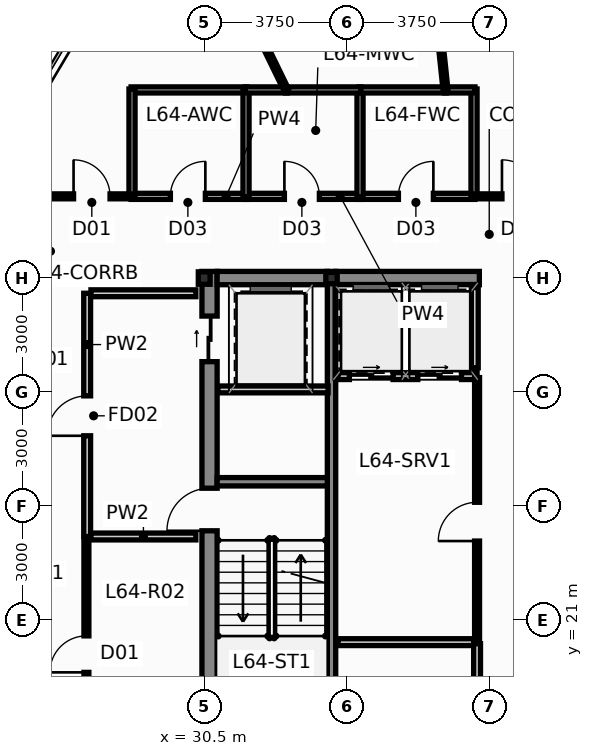
"""IFC4 building model, lengths in metres.
Left out: names, types, materials, properties, quantities, classifications, styles, units other than length and angle.
Written with IfcOpenShell. Run it as: python <this file> out.ifc"""

import sys

from ifc_helpers import new_model, si_unit, direction, frame, frame_2d, origin, origin_2d, place, context, subcontext, project, spatial, rectangle, hollow_rectangle, i_section, extrude, source, transform, mapped, element, fill, save


model = new_model("IFC4")
c1 = context("Model", 3, precision=1e-05, world=origin(), true_north=direction((0.0, 1.0)))
c2 = subcontext(c1, "Body", "Model", "MODEL_VIEW")
j1 = project(units=[si_unit("LENGTHUNIT", "METRE"), si_unit("PLANEANGLEUNIT", "RADIAN")], contexts=[c1])
p1 = place(None, origin())
s1 = spatial("IfcSite", under=j1, at=p1, CompositionType="ELEMENT")
p2 = place(p1, origin())
s2 = spatial("IfcBuilding", under=s1, at=p2, CompositionType="ELEMENT")
p3 = place(p2, frame((0.0, 0.0, 244.45)))
s3 = spatial("IfcBuildingStorey", under=s2, at=p3, CompositionType="ELEMENT", Elevation=244.45)
m1 = source(origin(), c2, "Body", "SweptSolid", [
    extrude(i_section(OverallWidth=0.311, OverallDepth=0.327, WebThickness=0.016, FlangeThickness=0.025, at=origin_2d()), origin(), (0.0, 0.0, 1.0), 3.65),
])
p4 = place(p3, frame((30.5, 30.0, 0.0), z_axis=(0.0, 0.0, 1.0), x_axis=(1.0, 0.0, 0.0)))
e1 = element("IfcColumn", 1, at=p4, inside=s3, PredefinedType="COLUMN", context=c2, shape_type="MappedRepresentation", body=[
    mapped(m1, transform((0.0, 0.0, 0.0), scale=1.0)),
])
m2 = source(origin(), c2, "Body", "SweptSolid", [
    extrude(hollow_rectangle(XDim=0.3, YDim=0.3, WallThickness=0.012, at=origin_2d()), origin(), (0.0, 0.0, 1.0), 3.65),
])
p5 = place(p3, frame((33.85, 30.0, 0.0), z_axis=(0.0, 0.0, 1.0), x_axis=(1.0, 0.0, 0.0)))
e2 = element("IfcColumn", 2, at=p5, inside=s3, PredefinedType="COLUMN", context=c2, shape_type="MappedRepresentation", body=[
    mapped(m2, transform((0.0, 0.0, 0.0), scale=1.0)),
])
p6 = place(p3, frame((30.64, 17.05, 0.0), z_axis=(0.0, 0.0, 1.0), x_axis=(0.0, 1.0, 0.0)))
e3 = element("IfcWall", 3, at=p6, inside=s3, PredefinedType="SHEAR", context=c2, shape_type="SweptSolid", body=[
    extrude(rectangle(XDim=13.125, YDim=0.4, at=frame_2d((6.562, 0.0))), origin(), (0.0, 0.0, 1.0), 3.65),
])
p7 = place(p6, frame((6.3, 0.0, 0.0)))
e4 = element("IfcOpeningElement", 4, at=p7, cuts=e3, PredefinedType="OPENING", context=c2, shape_type="SweptSolid", body=[
    extrude(rectangle(XDim=1.12, YDim=2.15, at=frame_2d((0.56, 1.075))), frame((0.0, 0.212, 0.0), z_axis=(0.0, -1.0, 0.0), x_axis=(1.0, 0.0, 0.0)), (0.0, 0.0, 1.0), 0.424),
])
p8 = place(p6, frame((10.75, 0.0, 0.0)))
e5 = element("IfcOpeningElement", 5, at=p8, cuts=e3, PredefinedType="OPENING", context=c2, shape_type="SweptSolid", body=[
    extrude(rectangle(XDim=1.2, YDim=2.2, at=frame_2d((0.6, 1.1))), frame((0.0, 0.212, 0.0), z_axis=(0.0, -1.0, 0.0), x_axis=(1.0, 0.0, 0.0)), (0.0, 0.0, 1.0), 0.424),
])
p9 = place(p3, frame((30.84, 30.0, 0.0), z_axis=(0.0, 0.0, 1.0), x_axis=(1.0, 0.0, 0.0)))
e6 = element("IfcWall", 6, at=p9, inside=s3, PredefinedType="SHEAR", context=c2, shape_type="SweptSolid", body=[
    extrude(rectangle(XDim=2.9, YDim=0.35, at=frame_2d((1.45, 0.0))), origin(), (0.0, 0.0, 1.0), 3.65),
])
p10 = place(p3, frame((33.96, 30.0, 0.0), z_axis=(0.0, 0.0, 1.0), x_axis=(1.0, 0.0, 0.0)))
e7 = element("IfcWall", 7, at=p10, inside=s3, PredefinedType="SHEAR", context=c2, shape_type="SweptSolid", body=[
    extrude(rectangle(XDim=3.78, YDim=0.35, at=frame_2d((1.89, 0.0))), origin(), (0.0, 0.0, 1.0), 3.65),
])
p11 = place(p3, frame((33.85, 17.05, 0.0), z_axis=(0.0, 0.0, 1.0), x_axis=(0.0, 1.0, 0.0)))
e8 = element("IfcWall", 8, at=p11, inside=s3, PredefinedType="SHEAR", context=c2, shape_type="SweptSolid", body=[
    extrude(rectangle(XDim=13.125, YDim=0.22, at=frame_2d((6.562, 0.0))), origin(), (0.0, 0.0, 1.0), 3.65),
])
p12 = place(p3, frame((30.84, 24.64, 0.0), z_axis=(0.0, 0.0, 1.0), x_axis=(1.0, 0.0, 0.0)))
e9 = element("IfcWall", 9, at=p12, inside=s3, PredefinedType="SHEAR", context=c2, shape_type="SweptSolid", body=[
    extrude(rectangle(XDim=2.9, YDim=0.22, at=frame_2d((1.45, 0.0))), origin(), (0.0, 0.0, 1.0), 3.65),
])
p13 = place(p3, frame((34.02, 27.42, 0.0), z_axis=(0.0, 0.0, 1.0), x_axis=(1.0, 0.0, 0.0)))
e10 = element("IfcWall", 10, at=p13, inside=s3, PredefinedType="PARTITIONING", context=c2, shape_type="SweptSolid", body=[
    extrude(rectangle(XDim=3.66, YDim=0.18, at=frame_2d((1.83, 0.0))), origin(), (0.0, 0.0, 1.0), 3.4),
])
p14 = place(p13, frame((0.3, 0.0, 0.0)))
e11 = element("IfcOpeningElement", 11, at=p14, cuts=e10, PredefinedType="OPENING", context=c2, shape_type="SweptSolid", body=[
    extrude(rectangle(XDim=1.15, YDim=2.2, at=frame_2d((0.575, 1.1))), frame((0.0, 0.102, 0.0), z_axis=(0.0, -1.0, 0.0), x_axis=(1.0, 0.0, 0.0)), (0.0, 0.0, 1.0), 0.204),
])
p15 = place(p13, frame((2.1, 0.0, 0.0)))
e12 = element("IfcOpeningElement", 12, at=p15, cuts=e10, PredefinedType="OPENING", context=c2, shape_type="SweptSolid", body=[
    extrude(rectangle(XDim=1.15, YDim=2.2, at=frame_2d((0.575, 1.1))), frame((0.0, 0.102, 0.0), z_axis=(0.0, -1.0, 0.0), x_axis=(1.0, 0.0, 0.0)), (0.0, 0.0, 1.0), 0.204),
])
p16 = place(p3, frame((37.62, 27.64, 0.0), z_axis=(0.0, 0.0, 1.0), x_axis=(0.0, 1.0, 0.0)))
e13 = element("IfcWall", 13, at=p16, inside=s3, PredefinedType="PARTITIONING", context=c2, shape_type="SweptSolid", body=[
    extrude(rectangle(XDim=2.11, YDim=0.18, at=frame_2d((1.055, 0.0))), origin(), (0.0, 0.0, 1.0), 3.4),
])
p17 = place(p3, frame((27.42, 23.2, 0.0), z_axis=(0.0, 0.0, 1.0), x_axis=(0.0, 1.0, 0.0)))
e14 = element("IfcWall", 14, at=p17, inside=s3, PredefinedType="PARTITIONING", context=c2, shape_type="SweptSolid", body=[
    extrude(rectangle(XDim=6.4, YDim=0.18, at=frame_2d((3.2, 0.0))), origin(), (0.0, 0.0, 1.0), 3.129),
])
p18 = place(p17, frame((2.65, 0.0, 0.0)))
e15 = element("IfcOpeningElement", 15, at=p18, cuts=e14, PredefinedType="OPENING", context=c2, shape_type="SweptSolid", body=[
    extrude(rectangle(XDim=1.05, YDim=2.15, at=frame_2d((0.525, 1.075))), frame((0.0, 0.102, 0.0), z_axis=(0.0, -1.0, 0.0), x_axis=(1.0, 0.0, 0.0)), (0.0, 0.0, 1.0), 0.204),
])
for number, where, z_axis, x_axis in (
    (16, (27.52, 23.2, 0.0), (0.0, 0.0, 1.0), (1.0, 0.0, 0.0)),
    (17, (27.52, 29.6, 0.0), (0.0, 0.0, 1.0), (1.0, 0.0, 0.0)),
):
    element("IfcWall", number, at=place(p3, frame(where, z_axis=z_axis, x_axis=x_axis)), inside=s3, PredefinedType="PARTITIONING", context=c2, shape_type="SweptSolid", body=[
        extrude(rectangle(XDim=2.76, YDim=0.18, at=frame_2d((1.38, 0.0))), origin(), (0.0, 0.0, 1.0), 3.4),
    ])
p19 = place(p3, frame((30.86, 27.07, 0.0), z_axis=(0.0, 0.0, 1.0), x_axis=(1.0, 0.0, 0.0)))
e18 = element("IfcWall", 18, at=p19, inside=s3, PredefinedType="PARTITIONING", context=c2, shape_type="SweptSolid", body=[
    extrude(rectangle(XDim=2.9, YDim=0.18, at=frame_2d((1.45, 0.0))), origin(), (0.0, 0.0, 1.0), 3.4),
])
p20 = place(p3, frame((34.02, 20.42, 0.0), z_axis=(0.0, 0.0, 1.0), x_axis=(1.0, 0.0, 0.0)))
e19 = element("IfcWall", 19, at=p20, inside=s3, PredefinedType="PARTITIONING", context=c2, shape_type="SweptSolid", body=[
    extrude(rectangle(XDim=3.64, YDim=0.18, at=frame_2d((1.82, 0.0))), origin(), (0.0, 0.0, 1.0), 3.4),
])
p21 = place(p3, frame((37.68, 20.48, 0.0), z_axis=(0.0, 0.0, 1.0), x_axis=(0.0, 1.0, 0.0)))
e20 = element("IfcWall", 20, at=p21, inside=s3, PredefinedType="PARTITIONING", context=c2, shape_type="SweptSolid", body=[
    extrude(rectangle(XDim=6.9, YDim=0.13, at=frame_2d((3.45, 0.0))), origin(), (0.0, 0.0, 1.0), 3.4),
])
p22 = place(p21, frame((2.6, 0.0, 0.0)))
e21 = element("IfcOpeningElement", 21, at=p22, cuts=e20, PredefinedType="OPENING", context=c2, shape_type="SweptSolid", body=[
    extrude(rectangle(XDim=1.02, YDim=2.15, at=frame_2d((0.51, 1.075))), frame((0.0, 0.077, 0.0), z_axis=(0.0, -1.0, 0.0), x_axis=(1.0, 0.0, 0.0)), (0.0, 0.0, 1.0), 0.154),
])
p23 = place(p3, frame((37.68, 17.68, 0.0), z_axis=(0.0, 0.0, 1.0), x_axis=(0.0, 1.0, 0.0)))
e22 = element("IfcWall", 22, at=p23, inside=s3, PredefinedType="PARTITIONING", context=c2, shape_type="SweptSolid", body=[
    extrude(rectangle(XDim=2.7, YDim=0.18, at=frame_2d((1.35, 0.0))), origin(), (0.0, 0.0, 1.0), 3.4),
])
p24 = place(p23, frame((0.85, 0.0, 0.0)))
e23 = element("IfcOpeningElement", 23, at=p24, cuts=e22, PredefinedType="OPENING", context=c2, shape_type="SweptSolid", body=[
    extrude(rectangle(XDim=0.9, YDim=2.1, at=frame_2d((0.45, 1.05))), frame((0.0, 0.102, 0.0), z_axis=(0.0, -1.0, 0.0), x_axis=(1.0, 0.0, 0.0)), (0.0, 0.0, 1.0), 0.204),
])
p25 = place(p3, frame((28.575, 32.15, 0.0), z_axis=(0.0, 0.0, 1.0), x_axis=(1.0, 0.0, 0.0)))
e24 = element("IfcWall", 24, at=p25, inside=s3, PredefinedType="PLUMBINGWALL", context=c2, shape_type="SweptSolid", body=[
    extrude(rectangle(XDim=3.05, YDim=0.16, at=frame_2d((1.525, 0.0))), origin(), (0.0, 0.0, 1.0), 3.4),
])
p26 = place(p25, frame((1.035, 0.0, 0.0)))
e25 = element("IfcOpeningElement", 25, at=p26, cuts=e24, PredefinedType="OPENING", context=c2, shape_type="SweptSolid", body=[
    extrude(rectangle(XDim=0.92, YDim=2.1, at=frame_2d((0.46, 1.05))), frame((0.0, 0.092, 0.0), z_axis=(0.0, -1.0, 0.0), x_axis=(1.0, 0.0, 0.0)), (0.0, 0.0, 1.0), 0.184),
])
p27 = place(p3, frame((31.575, 32.15, 0.0), z_axis=(0.0, 0.0, 1.0), x_axis=(1.0, 0.0, 0.0)))
e26 = element("IfcWall", 26, at=p27, inside=s3, PredefinedType="PLUMBINGWALL", context=c2, shape_type="SweptSolid", body=[
    extrude(rectangle(XDim=3.05, YDim=0.16, at=frame_2d((1.525, 0.0))), origin(), (0.0, 0.0, 1.0), 3.4),
])
p28 = place(p27, frame((1.035, 0.0, 0.0)))
e27 = element("IfcOpeningElement", 27, at=p28, cuts=e26, PredefinedType="OPENING", context=c2, shape_type="SweptSolid", body=[
    extrude(rectangle(XDim=0.92, YDim=2.1, at=frame_2d((0.46, 1.05))), frame((0.0, 0.092, 0.0), z_axis=(0.0, -1.0, 0.0), x_axis=(1.0, 0.0, 0.0)), (0.0, 0.0, 1.0), 0.184),
])
p29 = place(p3, frame((34.575, 32.15, 0.0), z_axis=(0.0, 0.0, 1.0), x_axis=(1.0, 0.0, 0.0)))
e28 = element("IfcWall", 28, at=p29, inside=s3, PredefinedType="PLUMBINGWALL", context=c2, shape_type="SweptSolid", body=[
    extrude(rectangle(XDim=3.05, YDim=0.16, at=frame_2d((1.525, 0.0))), origin(), (0.0, 0.0, 1.0), 3.4),
])
p30 = place(p29, frame((1.035, 0.0, 0.0)))
e29 = element("IfcOpeningElement", 29, at=p30, cuts=e28, PredefinedType="OPENING", context=c2, shape_type="SweptSolid", body=[
    extrude(rectangle(XDim=0.92, YDim=2.1, at=frame_2d((0.46, 1.05))), frame((0.0, 0.092, 0.0), z_axis=(0.0, -1.0, 0.0), x_axis=(1.0, 0.0, 0.0)), (0.0, 0.0, 1.0), 0.184),
])
p31 = place(p3, frame((28.575, 34.95, 0.0), z_axis=(0.0, 0.0, 1.0), x_axis=(1.0, 0.0, 0.0)))
e30 = element("IfcWall", 30, at=p31, inside=s3, PredefinedType="PLUMBINGWALL", context=c2, shape_type="SweptSolid", body=[
    extrude(rectangle(XDim=3.05, YDim=0.16, at=frame_2d((1.525, 0.0))), origin(), (0.0, 0.0, 1.0), 3.4),
])
for number, where, z_axis, x_axis in (
    (31, (31.6, 32.125, 0.0), (0.0, 0.0, 1.0), (0.0, 1.0, 0.0)),
    (32, (28.6, 32.125, 0.0), (0.0, 0.0, 1.0), (0.0, 1.0, 0.0)),
):
    element("IfcWall", number, at=place(p3, frame(where, z_axis=z_axis, x_axis=x_axis)), inside=s3, PredefinedType="PLUMBINGWALL", context=c2, shape_type="SweptSolid", body=[
        extrude(rectangle(XDim=2.85, YDim=0.16, at=frame_2d((1.425, 0.0))), origin(), (0.0, 0.0, 1.0), 2.985),
    ])
for number, where, z_axis, x_axis in (
    (33, (34.6, 32.125, 0.0), (0.0, 0.0, 1.0), (0.0, 1.0, 0.0)),
    (34, (37.6, 32.125, 0.0), (0.0, 0.0, 1.0), (0.0, 1.0, 0.0)),
):
    element("IfcWall", number, at=place(p3, frame(where, z_axis=z_axis, x_axis=x_axis)), inside=s3, PredefinedType="PLUMBINGWALL", context=c2, shape_type="SweptSolid", body=[
        extrude(rectangle(XDim=2.85, YDim=0.16, at=frame_2d((1.425, 0.0))), origin(), (0.0, 0.0, 1.0), 3.4),
    ])
p32 = place(p3, frame((34.575, 34.95, 0.0), z_axis=(0.0, 0.0, 1.0), x_axis=(1.0, 0.0, 0.0)))
e35 = element("IfcWall", 35, at=p32, inside=s3, PredefinedType="PLUMBINGWALL", context=c2, shape_type="SweptSolid", body=[
    extrude(rectangle(XDim=2.3, YDim=0.16, at=frame_2d((1.15, 0.0))), origin(), (0.0, 0.0, 1.0), 3.4),
])
p33 = place(p3, frame((32.635, 34.95, 0.0), z_axis=(0.0, 0.0, 1.0), x_axis=(1.0, 0.0, 0.0)))
e36 = element("IfcWall", 36, at=p33, inside=s3, PredefinedType="PLUMBINGWALL", context=c2, shape_type="SweptSolid", body=[
    extrude(rectangle(XDim=1.99, YDim=0.16, at=frame_2d((0.995, 0.0))), origin(), (0.0, 0.0, 1.0), 3.4),
])
p34 = place(p3, frame((31.575, 34.95, 0.0), z_axis=(0.0, 0.0, 1.0), x_axis=(1.0, 0.0, 0.0)))
e37 = element("IfcWall", 37, at=p34, inside=s3, PredefinedType="PLUMBINGWALL", context=c2, shape_type="SweptSolid", body=[
    extrude(rectangle(XDim=1.11, YDim=0.16, at=frame_2d((0.555, 0.0))), origin(), (0.0, 0.0, 1.0), 3.4),
])
p35 = place(p3, frame((37.625, 34.95, 0.0), z_axis=(0.0, 0.0, 1.0), x_axis=(-1.0, 0.0, 0.0)))
e38 = element("IfcWall", 38, at=p35, inside=s3, PredefinedType="PLUMBINGWALL", context=c2, shape_type="SweptSolid", body=[
    extrude(rectangle(XDim=0.8, YDim=0.16, at=frame_2d((0.4, 0.0))), origin(), (0.0, 0.0, 1.0), 3.4),
])
p36 = place(p3, frame((35.29, 49.813, 0.0), z_axis=(0.0, 0.0, 1.0), x_axis=(0.104358123872, -0.994539784012, 0.0)))
e39 = element("IfcWall", 39, at=p36, inside=s3, PredefinedType="PARTITIONING", context=c2, shape_type="SweptSolid", body=[
    extrude(rectangle(XDim=14.94, YDim=0.13, at=frame_2d((7.47, 0.0))), origin(), (0.0, 0.0, 1.0), 3.4),
])
p37 = place(p36, frame((7.039, 0.0, 0.0)))
e40 = element("IfcOpeningElement", 40, at=p37, cuts=e39, PredefinedType="OPENING", context=c2, shape_type="SweptSolid", body=[
    extrude(rectangle(XDim=0.96, YDim=2.15, at=frame_2d((0.48, 1.075))), frame((0.0, 0.077, 0.0), z_axis=(0.0, -1.0, 0.0), x_axis=(1.0, 0.0, 0.0)), (0.0, 0.0, 1.0), 0.154),
])
p38 = place(p3, frame((29.768, 40.882, 0.0), z_axis=(0.0, 0.0, 1.0), x_axis=(0.438247858151, -0.898854167719, 0.0)))
e41 = element("IfcWall", 41, at=p38, inside=s3, PredefinedType="PARTITIONING", context=c2, shape_type="SweptSolid", body=[
    extrude(rectangle(XDim=6.595, YDim=0.13, at=frame_2d((3.298, 0.0))), origin(), (0.0, 0.0, 1.0), 3.4),
])
p39 = place(p3, frame((27.4, 17.105, 0.0), z_axis=(0.0, 0.0, 1.0), x_axis=(0.0, 1.0, 0.0)))
e42 = element("IfcWall", 42, at=p39, inside=s3, PredefinedType="PARTITIONING", context=c2, shape_type="SweptSolid", body=[
    extrude(rectangle(XDim=6.0, YDim=0.13, at=frame_2d((3.0, 0.0))), origin(), (0.0, 0.0, 1.0), 3.4),
])
p40 = place(p39, frame((2.52, 0.0, 0.0)))
e43 = element("IfcOpeningElement", 43, at=p40, cuts=e42, PredefinedType="OPENING", context=c2, shape_type="SweptSolid", body=[
    extrude(rectangle(XDim=0.96, YDim=2.15, at=frame_2d((0.48, 1.075))), frame((0.0, 0.077, 0.0), z_axis=(0.0, -1.0, 0.0), x_axis=(1.0, 0.0, 0.0)), (0.0, 0.0, 1.0), 0.154),
])
p41 = place(p3, frame((24.602, 32.15, 0.0), z_axis=(0.0, 0.0, 1.0), x_axis=(1.0, 0.0, 0.0)))
e44 = element("IfcWall", 44, at=p41, inside=s3, PredefinedType="PARTITIONING", context=c2, shape_type="SweptSolid", body=[
    extrude(rectangle(XDim=3.993, YDim=0.13, at=frame_2d((1.997, 0.0))), origin(), (0.0, 0.0, 1.0), 3.4),
])
p42 = place(p41, frame((2.46, 0.0, 0.0)))
e45 = element("IfcOpeningElement", 45, at=p42, cuts=e44, PredefinedType="OPENING", context=c2, shape_type="SweptSolid", body=[
    extrude(rectangle(XDim=0.96, YDim=2.15, at=frame_2d((0.48, 1.075))), frame((0.0, 0.077, 0.0), z_axis=(0.0, -1.0, 0.0), x_axis=(1.0, 0.0, 0.0)), (0.0, 0.0, 1.0), 0.154),
])
p43 = place(p3, frame((37.605, 32.15, 0.0), z_axis=(0.0, 0.0, 1.0), x_axis=(1.0, 0.0, 0.0)))
e46 = element("IfcWall", 46, at=p43, inside=s3, PredefinedType="PARTITIONING", context=c2, shape_type="SweptSolid", body=[
    extrude(rectangle(XDim=2.42, YDim=0.13, at=frame_2d((1.21, 0.0))), origin(), (0.0, 0.0, 1.0), 3.4),
])
p44 = place(p43, frame((0.73, 0.0, 0.0)))
e47 = element("IfcOpeningElement", 47, at=p44, cuts=e46, PredefinedType="OPENING", context=c2, shape_type="SweptSolid", body=[
    extrude(rectangle(XDim=0.96, YDim=2.15, at=frame_2d((0.48, 1.075))), frame((0.0, 0.077, 0.0), z_axis=(0.0, -1.0, 0.0), x_axis=(1.0, 0.0, 0.0)), (0.0, 0.0, 1.0), 0.154),
])
p45 = place(p7, origin())
e48 = element("IfcDoor", 48, at=p45, inside=s3, OperationType="SINGLE_SWING_LEFT", PredefinedType="DOOR", context=c2, shape_type="SweptSolid", body=[
    extrude(rectangle(XDim=1.12, YDim=2.15, at=frame_2d((0.56, 1.075))), frame((0.0, 0.025, 0.0), z_axis=(0.0, -1.0, 0.0), x_axis=(1.0, 0.0, 0.0)), (0.0, 0.0, 1.0), 0.05),
])
fill(e4, e48)
p46 = place(p8, origin())
e49 = element("IfcDoor", 49, at=p46, inside=s3, OperationType="SLIDING_TO_LEFT", PredefinedType="DOOR", context=c2, shape_type="SweptSolid", body=[
    extrude(rectangle(XDim=1.2, YDim=2.2, at=frame_2d((0.6, 1.1))), frame((0.0, 0.025, 0.0), z_axis=(0.0, -1.0, 0.0), x_axis=(1.0, 0.0, 0.0)), (0.0, 0.0, 1.0), 0.05),
])
fill(e5, e49)
p47 = place(p14, origin())
e50 = element("IfcDoor", 50, at=p47, inside=s3, OperationType="SLIDING_TO_RIGHT", PredefinedType="DOOR", context=c2, shape_type="SweptSolid", body=[
    extrude(rectangle(XDim=1.15, YDim=2.2, at=frame_2d((0.575, 1.1))), frame((0.0, 0.025, 0.0), z_axis=(0.0, -1.0, 0.0), x_axis=(1.0, 0.0, 0.0)), (0.0, 0.0, 1.0), 0.05),
])
fill(e11, e50)
p48 = place(p15, origin())
e51 = element("IfcDoor", 51, at=p48, inside=s3, OperationType="SLIDING_TO_LEFT", PredefinedType="DOOR", context=c2, shape_type="SweptSolid", body=[
    extrude(rectangle(XDim=1.15, YDim=2.2, at=frame_2d((0.575, 1.1))), frame((0.0, 0.025, 0.0), z_axis=(0.0, -1.0, 0.0), x_axis=(1.0, 0.0, 0.0)), (0.0, 0.0, 1.0), 0.05),
])
fill(e12, e51)
p49 = place(p18, origin())
e52 = element("IfcDoor", 52, at=p49, inside=s3, OperationType="SINGLE_SWING_LEFT", PredefinedType="DOOR", context=c2, shape_type="SweptSolid", body=[
    extrude(rectangle(XDim=1.05, YDim=2.15, at=frame_2d((0.525, 1.075))), frame((0.0, 0.025, 0.0), z_axis=(0.0, -1.0, 0.0), x_axis=(1.0, 0.0, 0.0)), (0.0, 0.0, 1.0), 0.05),
])
fill(e15, e52)
p50 = place(p22, origin())
e53 = element("IfcDoor", 53, at=p50, inside=s3, OperationType="SINGLE_SWING_LEFT", PredefinedType="DOOR", context=c2, shape_type="SweptSolid", body=[
    extrude(rectangle(XDim=1.02, YDim=2.15, at=frame_2d((0.51, 1.075))), frame((0.0, 0.025, 0.0), z_axis=(0.0, -1.0, 0.0), x_axis=(1.0, 0.0, 0.0)), (0.0, 0.0, 1.0), 0.05),
])
fill(e21, e53)
p51 = place(p26, origin())
e54 = element("IfcDoor", 54, at=p51, inside=s3, OperationType="SINGLE_SWING_RIGHT", PredefinedType="DOOR", context=c2, shape_type="SweptSolid", body=[
    extrude(rectangle(XDim=0.92, YDim=2.1, at=frame_2d((0.46, 1.05))), frame((0.0, 0.025, 0.0), z_axis=(0.0, -1.0, 0.0), x_axis=(1.0, 0.0, 0.0)), (0.0, 0.0, 1.0), 0.05),
])
fill(e25, e54)
p52 = place(p28, origin())
e55 = element("IfcDoor", 55, at=p52, inside=s3, OperationType="SINGLE_SWING_LEFT", PredefinedType="DOOR", context=c2, shape_type="SweptSolid", body=[
    extrude(rectangle(XDim=0.92, YDim=2.1, at=frame_2d((0.46, 1.05))), frame((0.0, 0.025, 0.0), z_axis=(0.0, -1.0, 0.0), x_axis=(1.0, 0.0, 0.0)), (0.0, 0.0, 1.0), 0.05),
])
fill(e27, e55)
p53 = place(p30, origin())
e56 = element("IfcDoor", 56, at=p53, inside=s3, OperationType="SINGLE_SWING_RIGHT", PredefinedType="DOOR", context=c2, shape_type="SweptSolid", body=[
    extrude(rectangle(XDim=0.92, YDim=2.1, at=frame_2d((0.46, 1.05))), frame((0.0, 0.025, 0.0), z_axis=(0.0, -1.0, 0.0), x_axis=(1.0, 0.0, 0.0)), (0.0, 0.0, 1.0), 0.05),
])
fill(e29, e56)
p54 = place(p40, origin())
e57 = element("IfcDoor", 57, at=p54, inside=s3, OperationType="SINGLE_SWING_LEFT", PredefinedType="DOOR", context=c2, shape_type="SweptSolid", body=[
    extrude(rectangle(XDim=0.96, YDim=2.15, at=frame_2d((0.48, 1.075))), frame((0.0, 0.025, 0.0), z_axis=(0.0, -1.0, 0.0), x_axis=(1.0, 0.0, 0.0)), (0.0, 0.0, 1.0), 0.05),
])
fill(e43, e57)
p55 = place(p42, origin())
e58 = element("IfcDoor", 58, at=p55, inside=s3, OperationType="SINGLE_SWING_LEFT", PredefinedType="DOOR", context=c2, shape_type="SweptSolid", body=[
    extrude(rectangle(XDim=0.96, YDim=2.15, at=frame_2d((0.48, 1.075))), frame((0.0, 0.025, 0.0), z_axis=(0.0, -1.0, 0.0), x_axis=(1.0, 0.0, 0.0)), (0.0, 0.0, 1.0), 0.05),
])
fill(e45, e58)
p56 = place(p44, origin())
e59 = element("IfcDoor", 59, at=p56, inside=s3, OperationType="SINGLE_SWING_LEFT", PredefinedType="DOOR", context=c2, shape_type="SweptSolid", body=[
    extrude(rectangle(XDim=0.96, YDim=2.15, at=frame_2d((0.48, 1.075))), frame((0.0, 0.025, 0.0), z_axis=(0.0, -1.0, 0.0), x_axis=(1.0, 0.0, 0.0)), (0.0, 0.0, 1.0), 0.05),
])
fill(e47, e59)
save(model, sys.argv[1])
